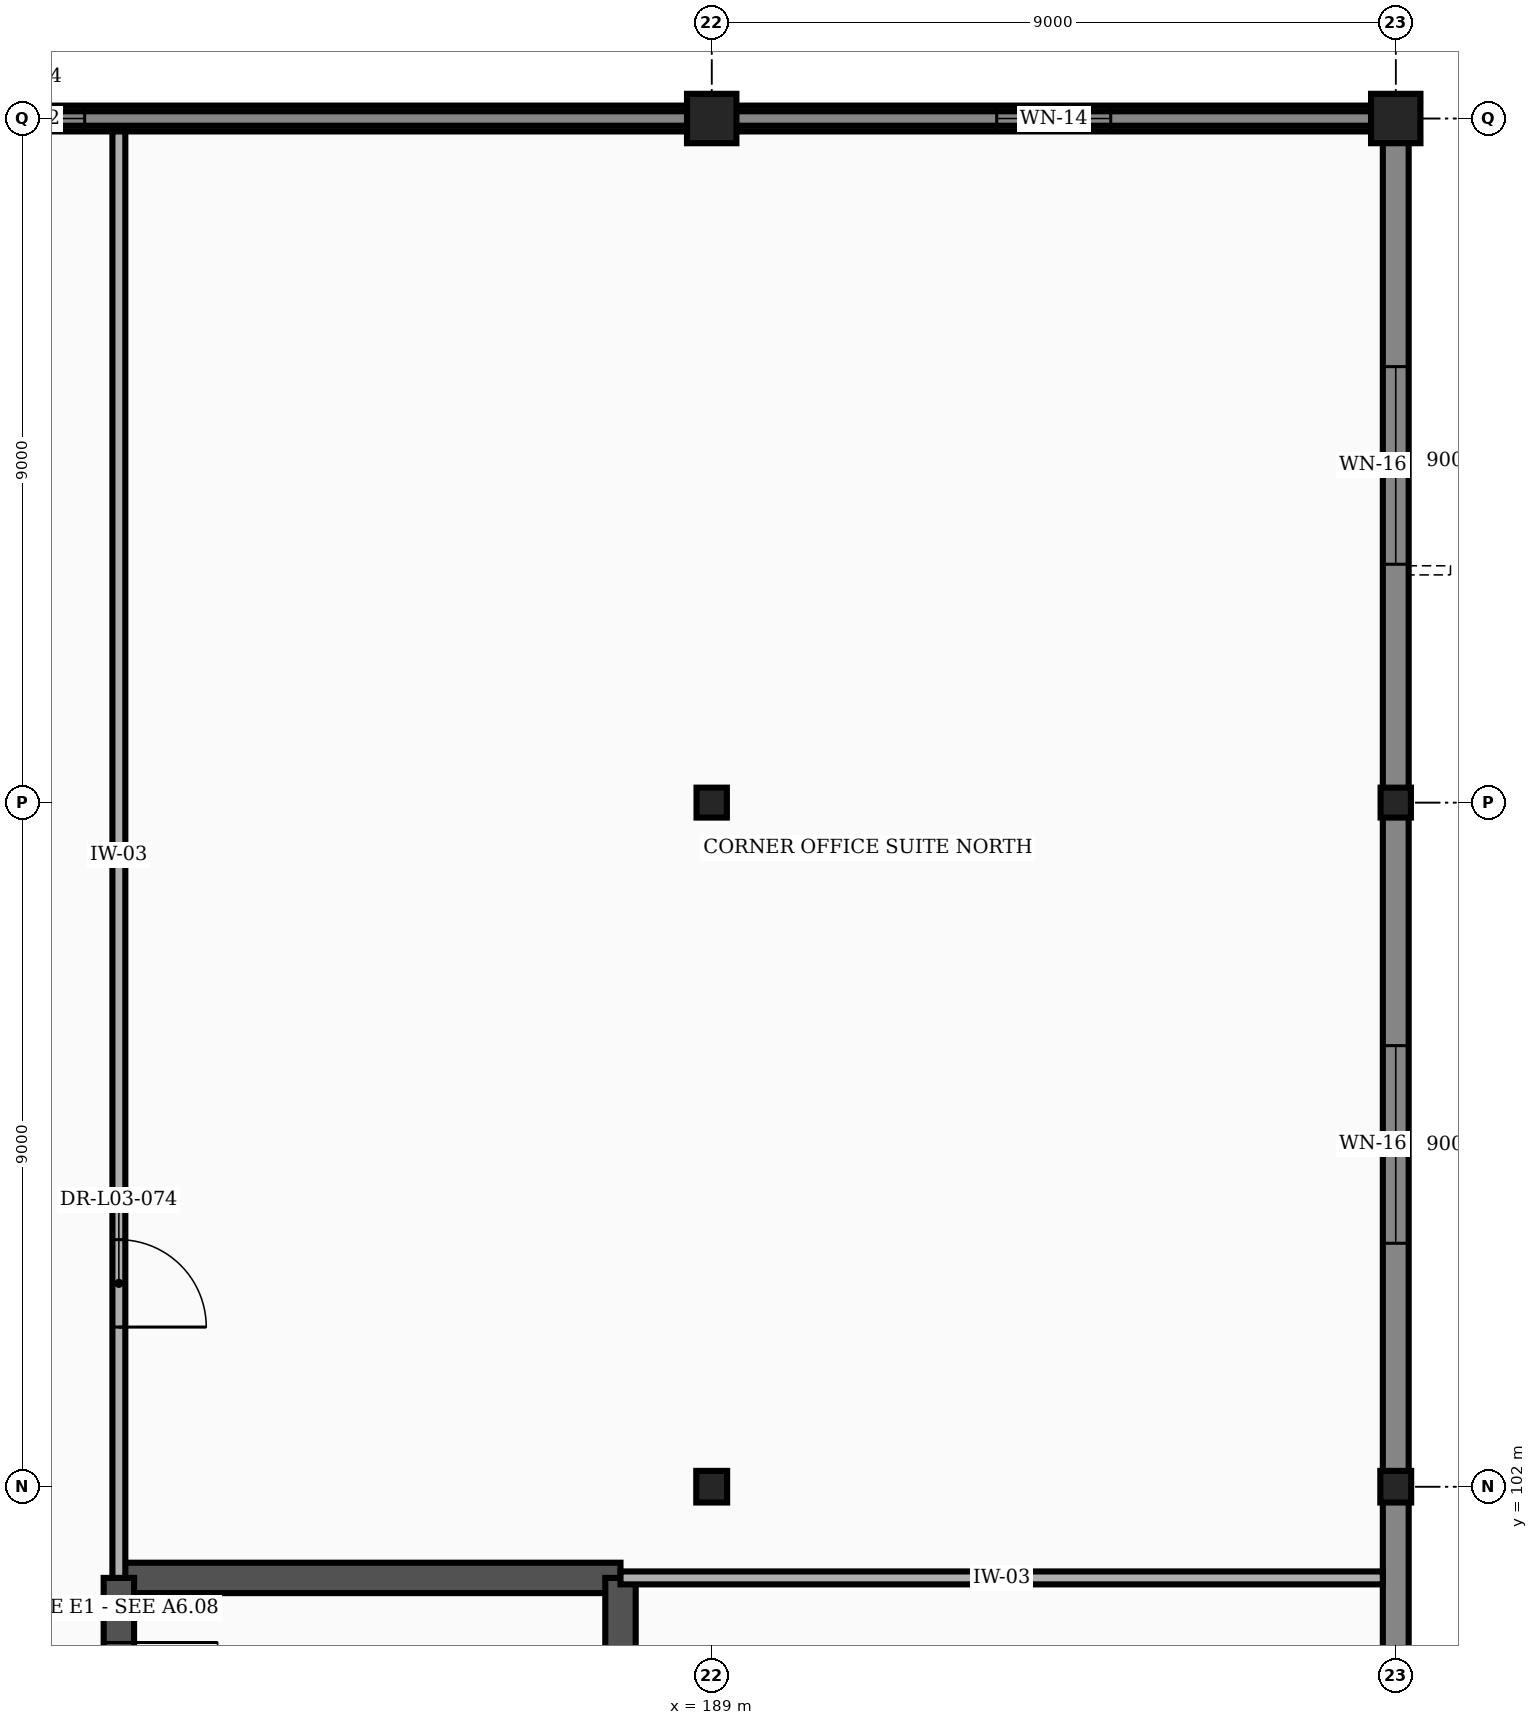
"""IFC4 building model, lengths in metres.
Left out: names, types, materials, properties, quantities, classifications, styles, units other than length and angle.
Written with IfcOpenShell. Run it as: python <this file> out.ifc"""

import sys

from ifc_helpers import new_model, si_unit, direction, frame, frame_2d, origin, origin_2d, place, context, subcontext, project, spatial, rectangle, i_section, extrude, element, fill, save


model = new_model("IFC4")
c1 = context("Model", 3, precision=1e-05, world=origin(), true_north=direction((0.0, 1.0)))
c2 = subcontext(c1, "Body", "Model", "MODEL_VIEW")
j1 = project(units=[si_unit("LENGTHUNIT", "METRE"), si_unit("PLANEANGLEUNIT", "RADIAN")], contexts=[c1])
p1 = place(None, origin())
s1 = spatial("IfcSite", under=j1, at=p1, CompositionType="ELEMENT")
p2 = place(p1, origin())
s2 = spatial("IfcBuilding", under=s1, at=p2, CompositionType="ELEMENT")
p3 = place(p2, frame((0.0, 0.0, 16.8)))
s3 = spatial("IfcBuildingStorey", under=s2, at=p3, CompositionType="ELEMENT", Elevation=16.8)
p4 = place(p3, frame((189.0, 102.0, 0.0), z_axis=(0.0, 0.0, 1.0), x_axis=(1.0, 0.0, 0.0)))
e1 = element("IfcColumn", 1, at=p4, inside=s3, PredefinedType="COLUMN", context=c2, shape_type="SweptSolid", body=[
    extrude(i_section(OverallWidth=0.406, OverallDepth=0.416, WebThickness=0.03, FlangeThickness=0.048, at=origin_2d()), origin(), (0.0, 0.0, 1.0), 4.8),
])
p5 = place(p3, frame((189.0, 111.0, 0.0), z_axis=(0.0, 0.0, 1.0), x_axis=(1.0, 0.0, 0.0)))
e2 = element("IfcColumn", 2, at=p5, inside=s3, PredefinedType="COLUMN", context=c2, shape_type="SweptSolid", body=[
    extrude(i_section(OverallWidth=0.399, OverallDepth=0.394, WebThickness=0.023, FlangeThickness=0.037, at=origin_2d()), origin(), (0.0, 0.0, 1.0), 4.8),
])
p6 = place(p3, frame((189.0, 120.0, 0.0), z_axis=(0.0, 0.0, 1.0), x_axis=(1.0, 0.0, 0.0)))
e3 = element("IfcColumn", 3, at=p6, inside=s3, PredefinedType="COLUMN", context=c2, shape_type="SweptSolid", body=[
    extrude(rectangle(XDim=0.65, YDim=0.65, at=origin_2d()), origin(), (0.0, 0.0, 1.0), 4.8),
])
p7 = place(p3, frame((198.0, 102.0, 0.0), z_axis=(0.0, 0.0, 1.0), x_axis=(1.0, 0.0, 0.0)))
e4 = element("IfcColumn", 4, at=p7, inside=s3, PredefinedType="COLUMN", context=c2, shape_type="SweptSolid", body=[
    extrude(i_section(OverallWidth=0.406, OverallDepth=0.416, WebThickness=0.03, FlangeThickness=0.048, at=origin_2d()), origin(), (0.0, 0.0, 1.0), 4.8),
])
p8 = place(p3, frame((198.0, 111.0, 0.0), z_axis=(0.0, 0.0, 1.0), x_axis=(1.0, 0.0, 0.0)))
e5 = element("IfcColumn", 5, at=p8, inside=s3, PredefinedType="COLUMN", context=c2, shape_type="SweptSolid", body=[
    extrude(i_section(OverallWidth=0.399, OverallDepth=0.394, WebThickness=0.023, FlangeThickness=0.037, at=origin_2d()), origin(), (0.0, 0.0, 1.0), 4.8),
])
p9 = place(p3, frame((198.0, 120.0, 0.0), z_axis=(0.0, 0.0, 1.0), x_axis=(1.0, 0.0, 0.0)))
e6 = element("IfcColumn", 6, at=p9, inside=s3, PredefinedType="COLUMN", context=c2, shape_type="SweptSolid", body=[
    extrude(rectangle(XDim=0.65, YDim=0.65, at=origin_2d()), origin(), (0.0, 0.0, 1.0), 4.8),
])
p10 = place(p3, frame((171.317, 120.0, 0.0), z_axis=(0.0, 0.0, 1.0), x_axis=(1.0, 0.0, 0.0)))
e7 = element("IfcWall", 7, at=p10, inside=s3, PredefinedType="STANDARD", context=c2, shape_type="SweptSolid", body=[
    extrude(rectangle(XDim=17.366, YDim=0.34, at=frame_2d((8.683, 0.0))), origin(), (0.0, 0.0, 1.0), 4.048),
])
p11 = place(p10, frame((7.933, 0.0, 0.85)))
e8 = element("IfcOpeningElement", 8, at=p11, cuts=e7, PredefinedType="OPENING", context=c2, shape_type="SweptSolid", body=[
    extrude(rectangle(XDim=1.5, YDim=1.8, at=frame_2d((0.75, 0.9))), frame((0.0, 0.182, 0.0), z_axis=(0.0, -1.0, 0.0), x_axis=(1.0, 0.0, 0.0)), (0.0, 0.0, 1.0), 0.364),
])
p12 = place(p3, frame((189.317, 120.0, 0.0), z_axis=(0.0, 0.0, 1.0), x_axis=(1.0, 0.0, 0.0)))
e9 = element("IfcWall", 9, at=p12, inside=s3, PredefinedType="STANDARD", context=c2, shape_type="SweptSolid", body=[
    extrude(rectangle(XDim=8.366, YDim=0.34, at=frame_2d((4.183, 0.0))), origin(), (0.0, 0.0, 1.0), 4.048),
])
p13 = place(p12, frame((3.433, 0.0, 0.85)))
e10 = element("IfcOpeningElement", 10, at=p13, cuts=e9, PredefinedType="OPENING", context=c2, shape_type="SweptSolid", body=[
    extrude(rectangle(XDim=1.5, YDim=1.8, at=frame_2d((0.75, 0.9))), frame((0.0, 0.182, 0.0), z_axis=(0.0, -1.0, 0.0), x_axis=(1.0, 0.0, 0.0)), (0.0, 0.0, 1.0), 0.364),
])
p14 = place(p3, frame((198.0, 84.194, 0.0), z_axis=(0.0, 0.0, 1.0), x_axis=(0.0, 1.0, 0.0)))
e11 = element("IfcWall", 11, at=p14, inside=s3, PredefinedType="STANDARD", context=c2, shape_type="SweptSolid", body=[
    extrude(rectangle(XDim=17.612, YDim=0.34, at=frame_2d((8.806, 0.0))), origin(), (0.0, 0.0, 1.0), 3.943),
])
p15 = place(p14, frame((7.506, 0.0, 0.85)))
e12 = element("IfcOpeningElement", 12, at=p15, cuts=e11, PredefinedType="OPENING", context=c2, shape_type="SweptSolid", body=[
    extrude(rectangle(XDim=2.6, YDim=2.2, at=frame_2d((1.3, 1.1))), frame((0.0, 0.182, 0.0), z_axis=(0.0, -1.0, 0.0), x_axis=(1.0, 0.0, 0.0)), (0.0, 0.0, 1.0), 0.364),
])
p16 = place(p3, frame((198.0, 102.194, 0.0), z_axis=(0.0, 0.0, 1.0), x_axis=(0.0, 1.0, 0.0)))
e13 = element("IfcWall", 13, at=p16, inside=s3, PredefinedType="STANDARD", context=c2, shape_type="SweptSolid", body=[
    extrude(rectangle(XDim=8.617, YDim=0.34, at=frame_2d((4.309, 0.0))), origin(), (0.0, 0.0, 1.0), 4.555),
])
p17 = place(p16, frame((3.009, 0.0, 0.85)))
e14 = element("IfcOpeningElement", 14, at=p17, cuts=e13, PredefinedType="OPENING", context=c2, shape_type="SweptSolid", body=[
    extrude(rectangle(XDim=2.6, YDim=2.2, at=frame_2d((1.3, 1.1))), frame((0.0, 0.182, 0.0), z_axis=(0.0, -1.0, 0.0), x_axis=(1.0, 0.0, 0.0)), (0.0, 0.0, 1.0), 0.364),
])
p18 = place(p3, frame((198.0, 111.189, 0.0), z_axis=(0.0, 0.0, 1.0), x_axis=(0.0, 1.0, 0.0)))
e15 = element("IfcWall", 15, at=p18, inside=s3, PredefinedType="STANDARD", context=c2, shape_type="SweptSolid", body=[
    extrude(rectangle(XDim=8.494, YDim=0.34, at=frame_2d((4.247, 0.0))), origin(), (0.0, 0.0, 1.0), 4.048),
])
p19 = place(p18, frame((2.947, 0.0, 0.85)))
e16 = element("IfcOpeningElement", 16, at=p19, cuts=e15, PredefinedType="OPENING", context=c2, shape_type="SweptSolid", body=[
    extrude(rectangle(XDim=2.6, YDim=2.2, at=frame_2d((1.3, 1.1))), frame((0.0, 0.182, 0.0), z_axis=(0.0, -1.0, 0.0), x_axis=(1.0, 0.0, 0.0)), (0.0, 0.0, 1.0), 0.364),
])
p20 = place(p3, frame((153.0, 120.0, 4.8), z_axis=(0.0, 0.0, 1.0), x_axis=(1.0, 0.0, 0.0)))
e17 = element("IfcWall", 17, at=p20, inside=s3, PredefinedType="PARAPET", context=c2, shape_type="SweptSolid", body=[
    extrude(rectangle(XDim=45.0, YDim=0.19, at=frame_2d((22.5, 0.0))), origin(), (0.0, 0.0, 1.0), 1.2),
])
p21 = place(p3, frame((181.2, 100.8, 0.0), z_axis=(0.0, 0.0, 1.0), x_axis=(1.0, 0.0, 0.0)))
e18 = element("IfcWall", 18, at=p21, inside=s3, PredefinedType="SHEAR", context=c2, shape_type="SweptSolid", body=[
    extrude(rectangle(XDim=6.6, YDim=0.4, at=frame_2d((3.3, 0.0))), origin(), (0.0, 0.0, 1.0), 4.555),
])
p22 = place(p3, frame((187.8, 85.2, 0.0), z_axis=(0.0, 0.0, 1.0), x_axis=(0.0, 1.0, 0.0)))
e19 = element("IfcWall", 19, at=p22, inside=s3, PredefinedType="SHEAR", context=c2, shape_type="SweptSolid", body=[
    extrude(rectangle(XDim=15.6, YDim=0.4, at=frame_2d((7.8, 0.0))), origin(), (0.0, 0.0, 1.0), 4.555),
])
p23 = place(p3, frame((181.2, 91.24, 0.0), z_axis=(0.0, 0.0, 1.0), x_axis=(0.0, 1.0, 0.0)))
e20 = element("IfcWall", 20, at=p23, inside=s3, PredefinedType="SHEAR", context=c2, shape_type="SweptSolid", body=[
    extrude(rectangle(XDim=9.56, YDim=0.4, at=frame_2d((4.78, 0.0))), origin(), (0.0, 0.0, 1.0), 4.555),
])
p24 = place(p23, frame((7.41, 0.0, 0.0)))
e21 = element("IfcOpeningElement", 21, at=p24, cuts=e20, PredefinedType="OPENING", context=c2, shape_type="SweptSolid", body=[
    extrude(rectangle(XDim=1.3, YDim=2.2, at=frame_2d((0.65, 1.1))), frame((0.0, 0.212, 0.0), z_axis=(0.0, -1.0, 0.0), x_axis=(1.0, 0.0, 0.0)), (0.0, 0.0, 1.0), 0.424),
])
p25 = place(p3, frame((187.8, 100.8, 0.0), z_axis=(0.0, 0.0, 1.0), x_axis=(1.0, 0.0, 0.0)))
e22 = element("IfcWall", 22, at=p25, inside=s3, PredefinedType="PARTITIONING", context=c2, shape_type="SweptSolid", body=[
    extrude(rectangle(XDim=10.03, YDim=0.17, at=frame_2d((5.015, 0.0))), origin(), (0.0, 0.0, 1.0), 4.555),
])
p26 = place(p3, frame((181.2, 100.8, 0.0), z_axis=(0.0, 0.0, 1.0), x_axis=(0.0, 1.0, 0.0)))
e23 = element("IfcWall", 23, at=p26, inside=s3, PredefinedType="PARTITIONING", context=c2, shape_type="SweptSolid", body=[
    extrude(rectangle(XDim=19.03, YDim=0.17, at=frame_2d((9.515, 0.0))), origin(), (0.0, 0.0, 1.0), 4.555),
])
p27 = place(p26, frame((3.3, 0.0, 0.0)))
e24 = element("IfcOpeningElement", 24, at=p27, cuts=e23, PredefinedType="OPENING", context=c2, shape_type="SweptSolid", body=[
    extrude(rectangle(XDim=1.15, YDim=2.15, at=frame_2d((0.575, 1.075))), frame((0.0, 0.097, 0.0), z_axis=(0.0, -1.0, 0.0), x_axis=(1.0, 0.0, 0.0)), (0.0, 0.0, 1.0), 0.194),
])
p28 = place(p11, origin())
e25 = element("IfcWindow", 25, at=p28, inside=s3, PartitioningType="SINGLE_PANEL", PredefinedType="WINDOW", context=c2, shape_type="SweptSolid", body=[
    extrude(rectangle(XDim=1.5, YDim=1.8, at=frame_2d((0.75, 0.9))), frame((0.0, 0.03, 0.0), z_axis=(0.0, -1.0, 0.0), x_axis=(1.0, 0.0, 0.0)), (0.0, 0.0, 1.0), 0.06),
])
fill(e8, e25)
p29 = place(p13, origin())
e26 = element("IfcWindow", 26, at=p29, inside=s3, PartitioningType="SINGLE_PANEL", PredefinedType="WINDOW", context=c2, shape_type="SweptSolid", body=[
    extrude(rectangle(XDim=1.5, YDim=1.8, at=frame_2d((0.75, 0.9))), frame((0.0, 0.03, 0.0), z_axis=(0.0, -1.0, 0.0), x_axis=(1.0, 0.0, 0.0)), (0.0, 0.0, 1.0), 0.06),
])
fill(e10, e26)
p30 = place(p17, origin())
e27 = element("IfcWindow", 27, at=p30, inside=s3, PartitioningType="SINGLE_PANEL", PredefinedType="WINDOW", context=c2, shape_type="SweptSolid", body=[
    extrude(rectangle(XDim=2.6, YDim=2.2, at=frame_2d((1.3, 1.1))), frame((0.0, 0.03, 0.0), z_axis=(0.0, -1.0, 0.0), x_axis=(1.0, 0.0, 0.0)), (0.0, 0.0, 1.0), 0.06),
])
fill(e14, e27)
p31 = place(p19, origin())
e28 = element("IfcWindow", 28, at=p31, inside=s3, PartitioningType="SINGLE_PANEL", PredefinedType="WINDOW", context=c2, shape_type="SweptSolid", body=[
    extrude(rectangle(XDim=2.6, YDim=2.2, at=frame_2d((1.3, 1.1))), frame((0.0, 0.03, 0.0), z_axis=(0.0, -1.0, 0.0), x_axis=(1.0, 0.0, 0.0)), (0.0, 0.0, 1.0), 0.06),
])
fill(e16, e28)
p32 = place(p24, frame((1.3, 0.0, 0.0), z_axis=(0.0, 0.0, 1.0), x_axis=(-1.0, 0.0, 0.0)))
e29 = element("IfcDoor", 29, at=p32, inside=s3, OperationType="SINGLE_SWING_LEFT", PredefinedType="DOOR", context=c2, shape_type="SweptSolid", body=[
    extrude(rectangle(XDim=1.3, YDim=2.2, at=frame_2d((0.65, 1.1))), frame((0.0, 0.025, 0.0), z_axis=(0.0, -1.0, 0.0), x_axis=(1.0, 0.0, 0.0)), (0.0, 0.0, 1.0), 0.05),
])
fill(e21, e29)
p33 = place(p27, frame((1.15, 0.0, 0.0), z_axis=(0.0, 0.0, 1.0), x_axis=(-1.0, 0.0, 0.0)))
e30 = element("IfcDoor", 30, at=p33, inside=s3, OperationType="SINGLE_SWING_RIGHT", PredefinedType="DOOR", context=c2, shape_type="SweptSolid", body=[
    extrude(rectangle(XDim=1.15, YDim=2.15, at=frame_2d((0.575, 1.075))), frame((0.0, 0.025, 0.0), z_axis=(0.0, -1.0, 0.0), x_axis=(1.0, 0.0, 0.0)), (0.0, 0.0, 1.0), 0.05),
])
fill(e24, e30)
save(model, sys.argv[1])
